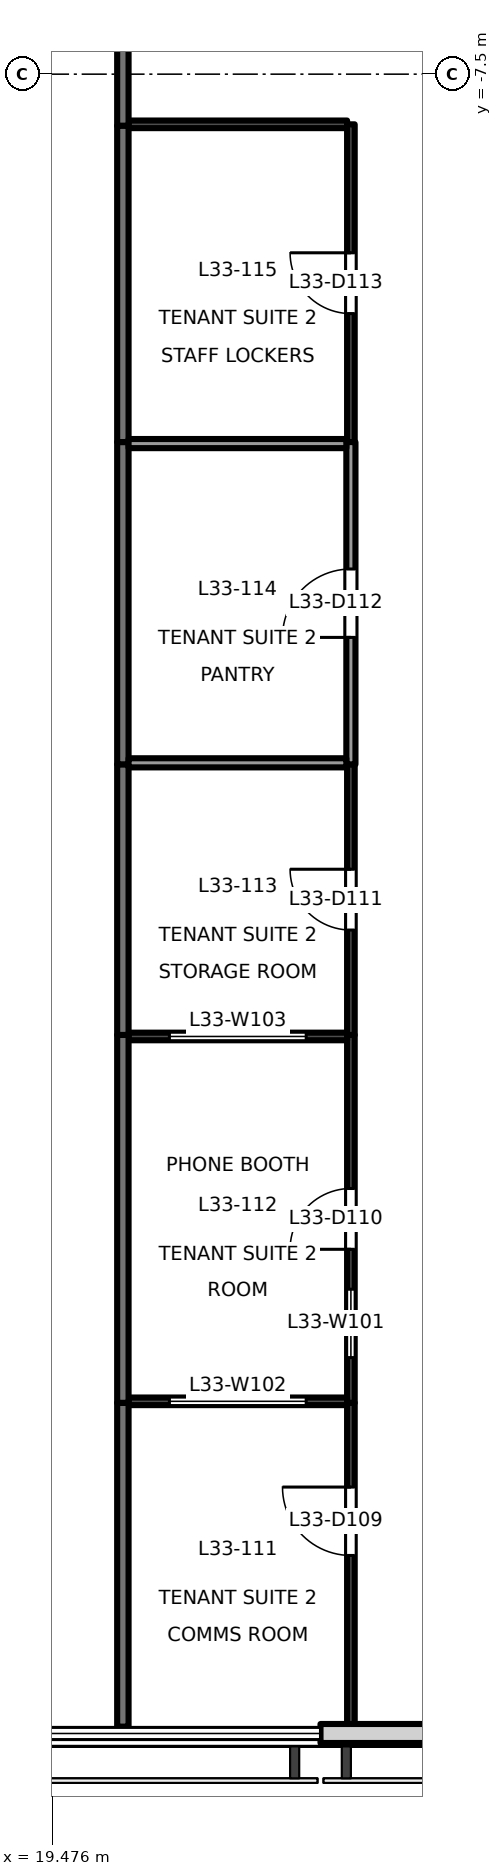
"""IFC4 building model, lengths in metres.
Left out: names, types, materials, properties, quantities, classifications, styles, units other than length and angle.
Written with IfcOpenShell. Run it as: python <this file> out.ifc"""

import sys

from ifc_helpers import new_model, si_unit, direction, frame, frame_2d, origin, place, context, subcontext, project, spatial, rectangle, extrude, element, fill, save


model = new_model("IFC4")
c1 = context("Model", 3, precision=1e-05, world=origin(), true_north=direction((0.0, 1.0)))
c2 = subcontext(c1, "Body", "Model", "MODEL_VIEW")
j1 = project(units=[si_unit("LENGTHUNIT", "METRE"), si_unit("PLANEANGLEUNIT", "RADIAN")], contexts=[c1])
p1 = place(None, origin())
s1 = spatial("IfcSite", under=j1, at=p1, CompositionType="ELEMENT")
p2 = place(p1, origin())
s2 = spatial("IfcBuilding", under=s1, at=p2, CompositionType="ELEMENT")
p3 = place(p2, frame((0.0, 0.0, 146.1)))
s3 = spatial("IfcBuildingStorey", under=s2, at=p3, CompositionType="ELEMENT", Elevation=146.1)
p4 = place(p3, frame((23.0, -29.33, 0.0), z_axis=(0.0, 0.0, 1.0), x_axis=(1.0, 0.0, 0.0)))
e1 = element("IfcWall", 1, at=p4, inside=s3, PredefinedType="SOLIDWALL", context=c2, shape_type="SweptSolid", body=[
    extrude(rectangle(XDim=2.705, YDim=0.25, at=frame_2d((1.353, 0.0))), origin(), (0.0, 0.0, 1.0), 3.8),
])
p5 = place(p3, frame((20.4, -2.14, 0.0), z_axis=(0.0, 0.0, 1.0), x_axis=(0.0, -1.0, 0.0)))
e2 = element("IfcWall", 2, at=p5, inside=s3, PredefinedType="PARTITIONING", context=c2, shape_type="SweptSolid", body=[
    extrude(rectangle(XDim=6.04, YDim=0.15, at=frame_2d((3.02, 0.0))), origin(), (0.0, 0.0, 1.0), 3.3),
])
p6 = place(p5, frame((3.055, 0.0, 0.0)))
e3 = element("IfcOpeningElement", 3, at=p6, cuts=e2, PredefinedType="OPENING", context=c2, shape_type="SweptSolid", body=[
    extrude(rectangle(XDim=1.8, YDim=2.1, at=frame_2d((0.9, 1.05))), frame((0.0, 0.085, 0.0), z_axis=(0.0, -1.0, 0.0), x_axis=(1.0, 0.0, 0.0)), (0.0, 0.0, 1.0), 0.171),
])
p7 = place(p3, frame((20.4, -24.98, 0.0), z_axis=(0.0, 0.0, 1.0), x_axis=(0.0, -1.0, 0.0)))
e4 = element("IfcWall", 4, at=p7, inside=s3, PredefinedType="PARTITIONING", context=c2, shape_type="SweptSolid", body=[
    extrude(rectangle(XDim=4.26, YDim=0.15, at=frame_2d((2.13, 0.0))), origin(), (0.0, 0.0, 1.0), 3.8),
])
p8 = place(p3, frame((20.4, -20.14, 0.0), z_axis=(0.0, 0.0, 1.0), x_axis=(0.0, -1.0, 0.0)))
e5 = element("IfcWall", 5, at=p8, inside=s3, PredefinedType="PARTITIONING", context=c2, shape_type="SweptSolid", body=[
    extrude(rectangle(XDim=4.84, YDim=0.15, at=frame_2d((2.42, 0.0))), origin(), (0.0, 0.0, 1.0), 3.8),
])
p9 = place(p3, frame((20.4, -16.58, 0.0), z_axis=(0.0, 0.0, 1.0), x_axis=(0.0, -1.0, 0.0)))
e6 = element("IfcWall", 6, at=p9, inside=s3, PredefinedType="PARTITIONING", context=c2, shape_type="SweptSolid", body=[
    extrude(rectangle(XDim=3.56, YDim=0.15, at=frame_2d((1.78, 0.0))), origin(), (0.0, 0.0, 1.0), 3.8),
])
p10 = place(p3, frame((20.4, -12.34, 0.0), z_axis=(0.0, 0.0, 1.0), x_axis=(0.0, -1.0, 0.0)))
e7 = element("IfcWall", 7, at=p10, inside=s3, PredefinedType="PARTITIONING", context=c2, shape_type="SweptSolid", body=[
    extrude(rectangle(XDim=4.24, YDim=0.15, at=frame_2d((2.12, 0.0))), origin(), (0.0, 0.0, 1.0), 3.8),
])
p11 = place(p3, frame((20.4, -8.18, 0.0), z_axis=(0.0, 0.0, 1.0), x_axis=(0.0, -1.0, 0.0)))
e8 = element("IfcWall", 8, at=p11, inside=s3, PredefinedType="PARTITIONING", context=c2, shape_type="SweptSolid", body=[
    extrude(rectangle(XDim=4.16, YDim=0.15, at=frame_2d((2.08, 0.0))), origin(), (0.0, 0.0, 1.0), 3.8),
])
p12 = place(p3, frame((23.4, -29.24, 0.0), z_axis=(0.0, 0.0, 1.0), x_axis=(0.0, 1.0, 0.0)))
e9 = element("IfcWall", 9, at=p12, inside=s3, PredefinedType="PARTITIONING", context=c2, shape_type="SweptSolid", body=[
    extrude(rectangle(XDim=4.26, YDim=0.1, at=frame_2d((2.13, 0.0))), origin(), (0.0, 0.0, 1.0), 3.8),
])
p13 = place(p12, frame((2.252, 0.0, 0.0)))
e10 = element("IfcOpeningElement", 10, at=p13, cuts=e9, PredefinedType="OPENING", context=c2, shape_type="SweptSolid", body=[
    extrude(rectangle(XDim=0.9, YDim=2.1, at=frame_2d((0.45, 1.05))), frame((0.0, 0.061, 0.0), z_axis=(0.0, -1.0, 0.0), x_axis=(1.0, 0.0, 0.0)), (0.0, 0.0, 1.0), 0.121),
])
p14 = place(p3, frame((23.4, -24.98, 0.0), z_axis=(0.0, 0.0, 1.0), x_axis=(0.0, 1.0, 0.0)))
e11 = element("IfcWall", 11, at=p14, inside=s3, PredefinedType="PARTITIONING", context=c2, shape_type="SweptSolid", body=[
    extrude(rectangle(XDim=4.84, YDim=0.1, at=frame_2d((2.42, 0.0))), origin(), (0.0, 0.0, 1.0), 3.8),
])
p15 = place(p14, frame((2.02, 0.0, 0.0)))
e12 = element("IfcOpeningElement", 12, at=p15, cuts=e11, PredefinedType="OPENING", context=c2, shape_type="SweptSolid", body=[
    extrude(rectangle(XDim=0.8, YDim=2.1, at=frame_2d((0.4, 1.05))), frame((0.0, 0.061, 0.0), z_axis=(0.0, -1.0, 0.0), x_axis=(1.0, 0.0, 0.0)), (0.0, 0.0, 1.0), 0.121),
])
p16 = place(p14, frame((0.595, 0.0, 0.9)))
e13 = element("IfcOpeningElement", 13, at=p16, cuts=e11, PredefinedType="OPENING", context=c2, shape_type="SweptSolid", body=[
    extrude(rectangle(XDim=0.9, YDim=1.2, at=frame_2d((0.45, 0.6))), frame((0.0, 0.061, 0.0), z_axis=(0.0, -1.0, 0.0), x_axis=(1.0, 0.0, 0.0)), (0.0, 0.0, 1.0), 0.121),
])
p17 = place(p3, frame((23.4, -20.14, 0.0), z_axis=(0.0, 0.0, 1.0), x_axis=(0.0, 1.0, 0.0)))
e14 = element("IfcWall", 14, at=p17, inside=s3, PredefinedType="PARTITIONING", context=c2, shape_type="SweptSolid", body=[
    extrude(rectangle(XDim=3.56, YDim=0.1, at=frame_2d((1.78, 0.0))), origin(), (0.0, 0.0, 1.0), 3.8),
])
p18 = place(p17, frame((1.38, 0.0, 0.0)))
e15 = element("IfcOpeningElement", 15, at=p18, cuts=e14, PredefinedType="OPENING", context=c2, shape_type="SweptSolid", body=[
    extrude(rectangle(XDim=0.8, YDim=2.1, at=frame_2d((0.4, 1.05))), frame((0.0, 0.061, 0.0), z_axis=(0.0, -1.0, 0.0), x_axis=(1.0, 0.0, 0.0)), (0.0, 0.0, 1.0), 0.121),
])
p19 = place(p3, frame((23.4, -16.58, 0.0), z_axis=(0.0, 0.0, 1.0), x_axis=(0.0, 1.0, 0.0)))
e16 = element("IfcWall", 16, at=p19, inside=s3, PredefinedType="PARTITIONING", context=c2, shape_type="SweptSolid", body=[
    extrude(rectangle(XDim=4.24, YDim=0.12, at=frame_2d((2.12, 0.0))), origin(), (0.0, 0.0, 1.0), 3.8),
])
p20 = place(p19, frame((1.67, 0.0, 0.0)))
e17 = element("IfcOpeningElement", 17, at=p20, cuts=e16, PredefinedType="OPENING", context=c2, shape_type="SweptSolid", body=[
    extrude(rectangle(XDim=0.9, YDim=2.1, at=frame_2d((0.45, 1.05))), frame((0.0, 0.071, 0.0), z_axis=(0.0, -1.0, 0.0), x_axis=(1.0, 0.0, 0.0)), (0.0, 0.0, 1.0), 0.141),
])
p21 = place(p3, frame((23.35, -8.16, 0.0), z_axis=(0.0, 0.0, 1.0), x_axis=(-1.0, 0.0, 0.0)))
e18 = element("IfcWall", 18, at=p21, inside=s3, PredefinedType="PARTITIONING", context=c2, shape_type="SweptSolid", body=[
    extrude(rectangle(XDim=2.875, YDim=0.1, at=frame_2d((1.438, 0.0))), origin(), (0.0, 0.0, 1.0), 3.8),
])
p22 = place(p3, frame((23.4, -12.34, 0.0), z_axis=(0.0, 0.0, 1.0), x_axis=(0.0, 1.0, 0.0)))
e19 = element("IfcWall", 19, at=p22, inside=s3, PredefinedType="PARTITIONING", context=c2, shape_type="SweptSolid", body=[
    extrude(rectangle(XDim=4.18, YDim=0.1, at=frame_2d((2.09, 0.0))), origin(), (0.0, 0.0, 1.0), 3.8),
])
p23 = place(p22, frame((1.69, 0.0, 0.0)))
e20 = element("IfcOpeningElement", 20, at=p23, cuts=e19, PredefinedType="OPENING", context=c2, shape_type="SweptSolid", body=[
    extrude(rectangle(XDim=0.8, YDim=2.1, at=frame_2d((0.4, 1.05))), frame((0.0, 0.061, 0.0), z_axis=(0.0, -1.0, 0.0), x_axis=(1.0, 0.0, 0.0)), (0.0, 0.0, 1.0), 0.121),
])
p24 = place(p3, frame((20.475, -24.96, 0.0), z_axis=(0.0, 0.0, 1.0), x_axis=(1.0, 0.0, 0.0)))
e21 = element("IfcWall", 21, at=p24, inside=s3, PredefinedType="PARTITIONING", context=c2, shape_type="SweptSolid", body=[
    extrude(rectangle(XDim=2.875, YDim=0.1, at=frame_2d((1.438, 0.0))), origin(), (0.0, 0.0, 1.0), 3.8),
])
p25 = place(p24, frame((0.537, 0.0, 0.9)))
e22 = element("IfcOpeningElement", 22, at=p25, cuts=e21, PredefinedType="OPENING", context=c2, shape_type="SweptSolid", body=[
    extrude(rectangle(XDim=1.8, YDim=1.2, at=frame_2d((0.9, 0.6))), frame((0.0, 0.061, 0.0), z_axis=(0.0, -1.0, 0.0), x_axis=(1.0, 0.0, 0.0)), (0.0, 0.0, 1.0), 0.121),
])
p26 = place(p3, frame((20.475, -20.16, 0.0), z_axis=(0.0, 0.0, 1.0), x_axis=(1.0, 0.0, 0.0)))
e23 = element("IfcWall", 23, at=p26, inside=s3, PredefinedType="PARTITIONING", context=c2, shape_type="SweptSolid", body=[
    extrude(rectangle(XDim=2.875, YDim=0.1, at=frame_2d((1.438, 0.0))), origin(), (0.0, 0.0, 1.0), 3.8),
])
p27 = place(p26, frame((0.537, 0.0, 0.9)))
e24 = element("IfcOpeningElement", 24, at=p27, cuts=e23, PredefinedType="OPENING", context=c2, shape_type="SweptSolid", body=[
    extrude(rectangle(XDim=1.8, YDim=1.2, at=frame_2d((0.9, 0.6))), frame((0.0, 0.061, 0.0), z_axis=(0.0, -1.0, 0.0), x_axis=(1.0, 0.0, 0.0)), (0.0, 0.0, 1.0), 0.121),
])
for number, where, z_axis, x_axis in (
    (25, (20.475, -16.56, 0.0), (0.0, 0.0, 1.0), (1.0, 0.0, 0.0)),
    (26, (20.475, -12.36, 0.0), (0.0, 0.0, 1.0), (1.0, 0.0, 0.0)),
):
    element("IfcWall", number, at=place(p3, frame(where, z_axis=z_axis, x_axis=x_axis)), inside=s3, PredefinedType="PARTITIONING", context=c2, shape_type="SweptSolid", body=[
        extrude(rectangle(XDim=2.865, YDim=0.12, at=frame_2d((1.433, 0.0))), origin(), (0.0, 0.0, 1.0), 3.8),
    ])
p28 = place(p13, origin())
e27 = element("IfcDoor", 27, at=p28, inside=s3, OperationType="SINGLE_SWING_RIGHT", PredefinedType="DOOR", context=c2, shape_type="SweptSolid", body=[
    extrude(rectangle(XDim=0.9, YDim=2.1, at=frame_2d((0.45, 1.05))), frame((0.0, 0.025, 0.0), z_axis=(0.0, -1.0, 0.0), x_axis=(1.0, 0.0, 0.0)), (0.0, 0.0, 1.0), 0.05),
])
fill(e10, e27)
p29 = place(p15, origin())
e28 = element("IfcDoor", 28, at=p29, inside=s3, OperationType="SINGLE_SWING_LEFT", PredefinedType="DOOR", context=c2, shape_type="SweptSolid", body=[
    extrude(rectangle(XDim=0.8, YDim=2.1, at=frame_2d((0.4, 1.05))), frame((0.0, 0.025, 0.0), z_axis=(0.0, -1.0, 0.0), x_axis=(1.0, 0.0, 0.0)), (0.0, 0.0, 1.0), 0.05),
])
fill(e12, e28)
p30 = place(p18, origin())
e29 = element("IfcDoor", 29, at=p30, inside=s3, OperationType="SINGLE_SWING_RIGHT", PredefinedType="DOOR", context=c2, shape_type="SweptSolid", body=[
    extrude(rectangle(XDim=0.8, YDim=2.1, at=frame_2d((0.4, 1.05))), frame((0.0, 0.025, 0.0), z_axis=(0.0, -1.0, 0.0), x_axis=(1.0, 0.0, 0.0)), (0.0, 0.0, 1.0), 0.05),
])
fill(e15, e29)
p31 = place(p20, origin())
e30 = element("IfcDoor", 30, at=p31, inside=s3, OperationType="SINGLE_SWING_LEFT", PredefinedType="DOOR", context=c2, shape_type="SweptSolid", body=[
    extrude(rectangle(XDim=0.9, YDim=2.1, at=frame_2d((0.45, 1.05))), frame((0.0, 0.025, 0.0), z_axis=(0.0, -1.0, 0.0), x_axis=(1.0, 0.0, 0.0)), (0.0, 0.0, 1.0), 0.05),
])
fill(e17, e30)
p32 = place(p23, origin())
e31 = element("IfcDoor", 31, at=p32, inside=s3, OperationType="SINGLE_SWING_RIGHT", PredefinedType="DOOR", context=c2, shape_type="SweptSolid", body=[
    extrude(rectangle(XDim=0.8, YDim=2.1, at=frame_2d((0.4, 1.05))), frame((0.0, 0.025, 0.0), z_axis=(0.0, -1.0, 0.0), x_axis=(1.0, 0.0, 0.0)), (0.0, 0.0, 1.0), 0.05),
])
fill(e20, e31)
p33 = place(p16, origin())
e32 = element("IfcWindow", 32, at=p33, inside=s3, PartitioningType="SINGLE_PANEL", PredefinedType="WINDOW", context=c2, shape_type="SweptSolid", body=[
    extrude(rectangle(XDim=0.9, YDim=1.2, at=frame_2d((0.45, 0.6))), frame((0.0, 0.03, 0.0), z_axis=(0.0, -1.0, 0.0), x_axis=(1.0, 0.0, 0.0)), (0.0, 0.0, 1.0), 0.06),
])
fill(e13, e32)
p34 = place(p25, origin())
e33 = element("IfcWindow", 33, at=p34, inside=s3, PartitioningType="SINGLE_PANEL", PredefinedType="WINDOW", context=c2, shape_type="SweptSolid", body=[
    extrude(rectangle(XDim=1.8, YDim=1.2, at=frame_2d((0.9, 0.6))), frame((0.0, 0.03, 0.0), z_axis=(0.0, -1.0, 0.0), x_axis=(1.0, 0.0, 0.0)), (0.0, 0.0, 1.0), 0.06),
])
fill(e22, e33)
p35 = place(p27, origin())
e34 = element("IfcWindow", 34, at=p35, inside=s3, PartitioningType="SINGLE_PANEL", PredefinedType="WINDOW", context=c2, shape_type="SweptSolid", body=[
    extrude(rectangle(XDim=1.8, YDim=1.2, at=frame_2d((0.9, 0.6))), frame((0.0, 0.03, 0.0), z_axis=(0.0, -1.0, 0.0), x_axis=(1.0, 0.0, 0.0)), (0.0, 0.0, 1.0), 0.06),
])
fill(e24, e34)
save(model, sys.argv[1])
